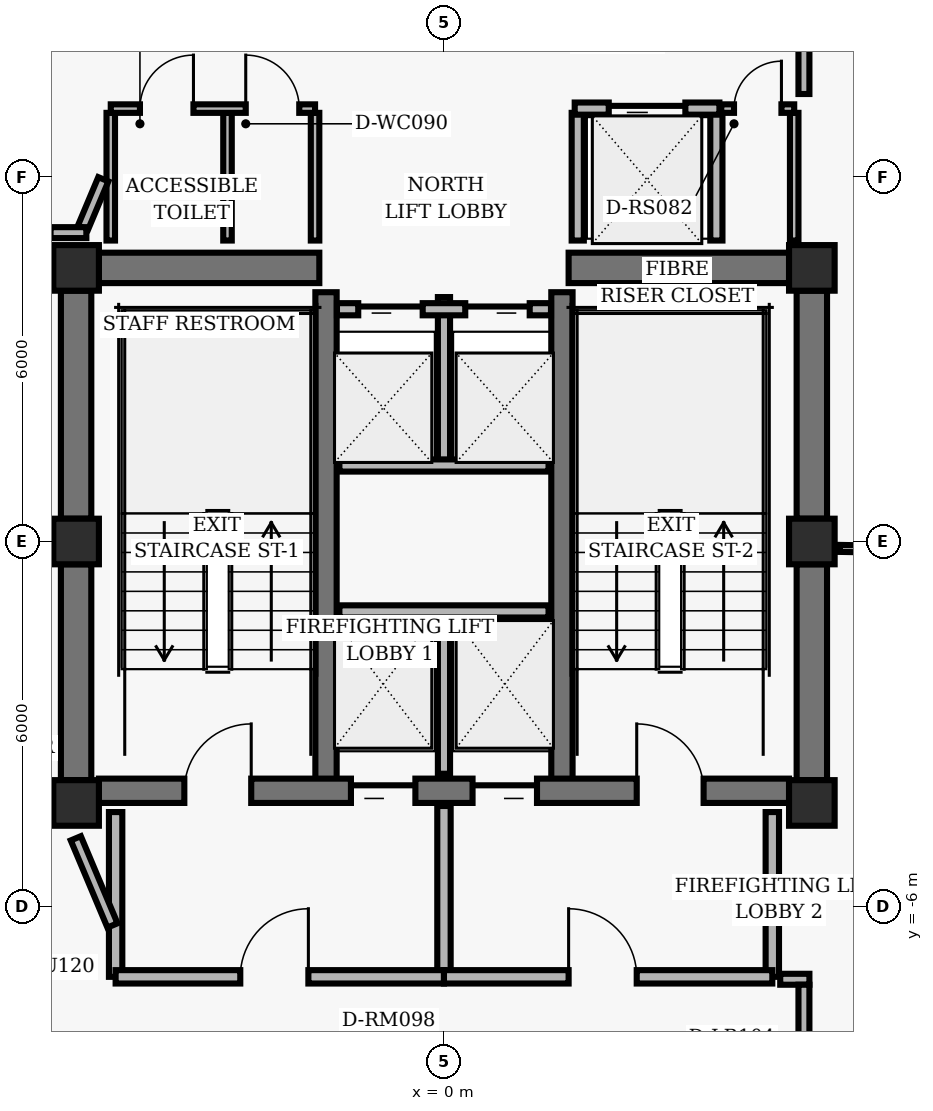
"""IFC4 building model, lengths in metres.
Left out: names, types, materials, properties, quantities, classifications, styles, units other than length and angle.
Written with IfcOpenShell. Run it as: python <this file> out.ifc"""

import sys

from ifc_helpers import new_model, si_unit, direction, frame, frame_2d, origin, origin_2d, place, context, subcontext, project, spatial, rectangle, hollow_rectangle, extrude, element, fill, save


model = new_model("IFC4")
c1 = context("Model", 3, precision=1e-05, world=origin(), true_north=direction((0.0, 1.0)))
c2 = subcontext(c1, "Body", "Model", "MODEL_VIEW")
j1 = project(units=[si_unit("LENGTHUNIT", "METRE"), si_unit("PLANEANGLEUNIT", "RADIAN")], contexts=[c1])
p1 = place(None, origin())
s1 = spatial("IfcSite", under=j1, at=p1, CompositionType="ELEMENT")
p2 = place(p1, origin())
s2 = spatial("IfcBuilding", under=s1, at=p2, CompositionType="ELEMENT")
p3 = place(p2, frame((0.0, 0.0, 208.8)))
s3 = spatial("IfcBuildingStorey", under=s2, at=p3, CompositionType="ELEMENT", Elevation=208.8)
for number, where, z_axis, x_axis in (
    (1, (-6.05, 4.5, 0.0), (0.0, 0.0, 1.0), (1.0, 0.0, 0.0)),
    (2, (6.05, 4.5, 0.0), (0.0, 0.0, 1.0), (1.0, 0.0, 0.0)),
    (3, (-6.05, 0.0, 0.0), (0.0, 0.0, 1.0), (1.0, 0.0, 0.0)),
    (4, (6.05, 0.0, 0.0), (0.0, 0.0, 1.0), (1.0, 0.0, 0.0)),
    (5, (-6.05, -4.3, 0.0), (0.0, 0.0, 1.0), (1.0, 0.0, 0.0)),
    (6, (6.05, -4.3, 0.0), (0.0, 0.0, 1.0), (1.0, 0.0, 0.0)),
):
    element("IfcColumn", number, at=place(p3, frame(where, z_axis=z_axis, x_axis=x_axis)), inside=s3, PredefinedType="COLUMN", context=c2, shape_type="SweptSolid", body=[
        extrude(hollow_rectangle(XDim=0.75, YDim=0.75, WallThickness=0.05, InnerFilletRadius=0.02, OuterFilletRadius=0.04, at=origin_2d()), origin(), (0.0, 0.0, 1.0), 3.04),
    ])
p4 = place(p3, frame((-6.05, 0.375, 0.0), z_axis=(0.0, 0.0, 1.0), x_axis=(0.0, 1.0, 0.0)))
e7 = element("IfcWall", 7, at=p4, inside=s3, PredefinedType="SHEAR", context=c2, shape_type="SweptSolid", body=[
    extrude(rectangle(XDim=3.75, YDim=0.5, at=frame_2d((1.875, 0.0))), origin(), (0.0, 0.0, 1.0), 2.798),
])
p5 = place(p3, frame((-6.05, -3.925, 0.0), z_axis=(0.0, 0.0, 1.0), x_axis=(0.0, 1.0, 0.0)))
e8 = element("IfcWall", 8, at=p5, inside=s3, PredefinedType="SHEAR", context=c2, shape_type="SweptSolid", body=[
    extrude(rectangle(XDim=3.55, YDim=0.5, at=frame_2d((1.775, 0.0))), origin(), (0.0, 0.0, 1.0), 2.798),
])
p6 = place(p3, frame((6.05, 0.375, 0.0), z_axis=(0.0, 0.0, 1.0), x_axis=(0.0, 1.0, 0.0)))
e9 = element("IfcWall", 9, at=p6, inside=s3, PredefinedType="SHEAR", context=c2, shape_type="SweptSolid", body=[
    extrude(rectangle(XDim=3.75, YDim=0.5, at=frame_2d((1.875, 0.0))), origin(), (0.0, 0.0, 1.0), 2.798),
])
p7 = place(p3, frame((6.05, -3.925, 0.0), z_axis=(0.0, 0.0, 1.0), x_axis=(0.0, 1.0, 0.0)))
e10 = element("IfcWall", 10, at=p7, inside=s3, PredefinedType="SHEAR", context=c2, shape_type="SweptSolid", body=[
    extrude(rectangle(XDim=3.55, YDim=0.5, at=frame_2d((1.775, 0.0))), origin(), (0.0, 0.0, 1.0), 2.798),
])
for number, where, z_axis, x_axis in (
    (11, (-1.94, -4.1, 0.0), (0.0, 0.0, 1.0), (0.0, 1.0, 0.0)),
    (12, (1.94, -4.1, 0.0), (0.0, 0.0, 1.0), (0.0, 1.0, 0.0)),
):
    element("IfcWall", number, at=place(p3, frame(where, z_axis=z_axis, x_axis=x_axis)), inside=s3, PredefinedType="SHEAR", context=c2, shape_type="SweptSolid", body=[
        extrude(rectangle(XDim=8.2, YDim=0.35, at=frame_2d((4.1, 0.0))), origin(), (0.0, 0.0, 1.0), 2.798),
    ])
p8 = place(p3, frame((-5.675, -4.1, 0.0), z_axis=(0.0, 0.0, 1.0), x_axis=(1.0, 0.0, 0.0)))
e13 = element("IfcWall", 13, at=p8, inside=s3, PredefinedType="SHEAR", context=c2, shape_type="SweptSolid", body=[
    extrude(rectangle(XDim=11.35, YDim=0.4, at=frame_2d((5.675, 0.0))), origin(), (0.0, 0.0, 1.0), 2.798),
])
p9 = place(p8, frame((1.405, 0.0, 0.0)))
e14 = element("IfcOpeningElement", 14, at=p9, cuts=e13, PredefinedType="OPENING", context=c2, shape_type="SweptSolid", body=[
    extrude(rectangle(XDim=1.1, YDim=2.04, at=frame_2d((0.55, 1.02))), frame((0.0, 0.21, 0.0), z_axis=(0.0, -1.0, 0.0), x_axis=(1.0, 0.0, 0.0)), (0.0, 0.0, 1.0), 0.42),
])
p10 = place(p8, frame((8.845, 0.0, 0.0)))
e15 = element("IfcOpeningElement", 15, at=p10, cuts=e13, PredefinedType="OPENING", context=c2, shape_type="SweptSolid", body=[
    extrude(rectangle(XDim=1.1, YDim=2.04, at=frame_2d((0.55, 1.02))), frame((0.0, 0.21, 0.0), z_axis=(0.0, -1.0, 0.0), x_axis=(1.0, 0.0, 0.0)), (0.0, 0.0, 1.0), 0.42),
])
p11 = place(p8, frame((4.145, 0.0, 0.0)))
e16 = element("IfcOpeningElement", 16, at=p11, cuts=e13, PredefinedType="OPENING", context=c2, shape_type="SweptSolid", body=[
    extrude(rectangle(XDim=1.06, YDim=2.04, at=frame_2d((0.53, 1.02))), frame((0.0, 0.21, 0.0), z_axis=(0.0, -1.0, 0.0), x_axis=(1.0, 0.0, 0.0)), (0.0, 0.0, 1.0), 0.42),
])
p12 = place(p8, frame((6.145, 0.0, 0.0)))
e17 = element("IfcOpeningElement", 17, at=p12, cuts=e13, PredefinedType="OPENING", context=c2, shape_type="SweptSolid", body=[
    extrude(rectangle(XDim=1.06, YDim=2.04, at=frame_2d((0.53, 1.02))), frame((0.0, 0.21, 0.0), z_axis=(0.0, -1.0, 0.0), x_axis=(1.0, 0.0, 0.0)), (0.0, 0.0, 1.0), 0.42),
])
for number, where, z_axis, x_axis in (
    (18, (-5.675, 4.5, 0.0), (0.0, 0.0, 1.0), (1.0, 0.0, 0.0)),
    (19, (2.05, 4.5, 0.0), (0.0, 0.0, 1.0), (1.0, 0.0, 0.0)),
):
    element("IfcWall", number, at=place(p3, frame(where, z_axis=z_axis, x_axis=x_axis)), inside=s3, PredefinedType="SHEAR", context=c2, shape_type="SweptSolid", body=[
        extrude(rectangle(XDim=3.625, YDim=0.5, at=frame_2d((1.812, 0.0))), origin(), (0.0, 0.0, 1.0), 2.798),
    ])
p13 = place(p3, frame((0.0, -3.82, 0.0), z_axis=(0.0, 0.0, 1.0), x_axis=(0.0, 1.0, 0.0)))
e20 = element("IfcWall", 20, at=p13, inside=s3, PredefinedType="PARTITIONING", context=c2, shape_type="SweptSolid", body=[
    extrude(rectangle(XDim=2.67, YDim=0.2, at=frame_2d((1.335, 0.0))), origin(), (0.0, 0.0, 1.0), 2.773),
])
p14 = place(p3, frame((-1.72, -1.15, 0.0), z_axis=(0.0, 0.0, 1.0), x_axis=(1.0, 0.0, 0.0)))
e21 = element("IfcWall", 21, at=p14, inside=s3, PredefinedType="PARTITIONING", context=c2, shape_type="SweptSolid", body=[
    extrude(rectangle(XDim=3.44, YDim=0.2, at=frame_2d((1.72, 0.0))), origin(), (0.0, 0.0, 1.0), 2.773),
])
for number, where, z_axis, x_axis in (
    (22, (-5.4, -7.16, 0.0), (0.0, 0.0, 1.0), (0.0, 1.0, 0.0)),
    (23, (5.4, -7.16, 0.0), (0.0, 0.0, 1.0), (0.0, 1.0, 0.0)),
):
    element("IfcWall", number, at=place(p3, frame(where, z_axis=z_axis, x_axis=x_axis)), inside=s3, PredefinedType="PARTITIONING", context=c2, shape_type="SweptSolid", body=[
        extrude(rectangle(XDim=2.71, YDim=0.22, at=frame_2d((1.355, 0.0))), origin(), (0.0, 0.0, 1.0), 2.773),
    ])
p15 = place(p3, frame((0.0, -7.16, 0.0), z_axis=(0.0, 0.0, 1.0), x_axis=(0.0, 1.0, 0.0)))
e24 = element("IfcWall", 24, at=p15, inside=s3, PredefinedType="PARTITIONING", context=c2, shape_type="SweptSolid", body=[
    extrude(rectangle(XDim=2.81, YDim=0.22, at=frame_2d((1.405, 0.0))), origin(), (0.0, 0.0, 1.0), 2.773),
])
p16 = place(p3, frame((-5.4, -7.16, 0.0), z_axis=(0.0, 0.0, 1.0), x_axis=(1.0, 0.0, 0.0)))
e25 = element("IfcWall", 25, at=p16, inside=s3, PredefinedType="PARTITIONING", context=c2, shape_type="SweptSolid", body=[
    extrude(rectangle(XDim=5.4, YDim=0.22, at=frame_2d((2.7, 0.0))), origin(), (0.0, 0.0, 1.0), 2.395),
])
p17 = place(p16, frame((2.05, 0.0, 0.0)))
e26 = element("IfcOpeningElement", 26, at=p17, cuts=e25, PredefinedType="OPENING", context=c2, shape_type="SweptSolid", body=[
    extrude(rectangle(XDim=1.12, YDim=2.02, at=frame_2d((0.56, 1.01))), frame((0.0, 0.12, 0.0), z_axis=(0.0, -1.0, 0.0), x_axis=(1.0, 0.0, 0.0)), (0.0, 0.0, 1.0), 0.24),
])
p18 = place(p3, frame((0.0, -7.16, 0.0), z_axis=(0.0, 0.0, 1.0), x_axis=(1.0, 0.0, 0.0)))
e27 = element("IfcWall", 27, at=p18, inside=s3, PredefinedType="PARTITIONING", context=c2, shape_type="SweptSolid", body=[
    extrude(rectangle(XDim=5.4, YDim=0.22, at=frame_2d((2.7, 0.0))), origin(), (0.0, 0.0, 1.0), 2.773),
])
p19 = place(p18, frame((2.05, 0.0, 0.0)))
e28 = element("IfcOpeningElement", 28, at=p19, cuts=e27, PredefinedType="OPENING", context=c2, shape_type="SweptSolid", body=[
    extrude(rectangle(XDim=1.12, YDim=2.02, at=frame_2d((0.56, 1.01))), frame((0.0, 0.12, 0.0), z_axis=(0.0, -1.0, 0.0), x_axis=(1.0, 0.0, 0.0)), (0.0, 0.0, 1.0), 0.24),
])
p20 = place(p3, frame((0.0, 1.25, 0.0), z_axis=(0.0, 0.0, 1.0), x_axis=(0.0, 1.0, 0.0)))
e29 = element("IfcWall", 29, at=p20, inside=s3, PredefinedType="PARTITIONING", context=c2, shape_type="SweptSolid", body=[
    extrude(rectangle(XDim=2.77, YDim=0.2, at=frame_2d((1.385, 0.0))), origin(), (0.0, 0.0, 1.0), 2.773),
])
p21 = place(p3, frame((-1.72, 1.25, 0.0), z_axis=(0.0, 0.0, 1.0), x_axis=(1.0, 0.0, 0.0)))
e30 = element("IfcWall", 30, at=p21, inside=s3, PredefinedType="PARTITIONING", context=c2, shape_type="SweptSolid", body=[
    extrude(rectangle(XDim=3.44, YDim=0.2, at=frame_2d((1.72, 0.0))), origin(), (0.0, 0.0, 1.0), 2.773),
])
p22 = place(p3, frame((-1.76, 3.82, 0.0), z_axis=(0.0, 0.0, 1.0), x_axis=(1.0, 0.0, 0.0)))
e31 = element("IfcWall", 31, at=p22, inside=s3, PredefinedType="PARTITIONING", context=c2, shape_type="SweptSolid", body=[
    extrude(rectangle(XDim=3.52, YDim=0.2, at=frame_2d((1.76, 0.0))), origin(), (0.0, 0.0, 1.0), 2.773),
])
p23 = place(p22, frame((0.35, 0.0, 0.0)))
e32 = element("IfcOpeningElement", 32, at=p23, cuts=e31, PredefinedType="OPENING", context=c2, shape_type="SweptSolid", body=[
    extrude(rectangle(XDim=1.06, YDim=2.04, at=frame_2d((0.53, 1.02))), frame((0.0, 0.11, 0.0), z_axis=(0.0, -1.0, 0.0), x_axis=(1.0, 0.0, 0.0)), (0.0, 0.0, 1.0), 0.22),
])
p24 = place(p22, frame((2.11, 0.0, 0.0)))
e33 = element("IfcOpeningElement", 33, at=p24, cuts=e31, PredefinedType="OPENING", context=c2, shape_type="SweptSolid", body=[
    extrude(rectangle(XDim=1.06, YDim=2.04, at=frame_2d((0.53, 1.02))), frame((0.0, 0.11, 0.0), z_axis=(0.0, -1.0, 0.0), x_axis=(1.0, 0.0, 0.0)), (0.0, 0.0, 1.0), 0.22),
])
for number, where, z_axis, x_axis in (
    (34, (2.2, 4.95, 0.0), (0.0, 0.0, 1.0), (0.0, 1.0, 0.0)),
    (35, (4.48, 4.95, 0.0), (0.0, 0.0, 1.0), (0.0, 1.0, 0.0)),
):
    element("IfcWall", number, at=place(p3, frame(where, z_axis=z_axis, x_axis=x_axis)), inside=s3, PredefinedType="PARTITIONING", context=c2, shape_type="SweptSolid", body=[
        extrude(rectangle(XDim=2.1, YDim=0.2, at=frame_2d((1.05, 0.0))), origin(), (0.0, 0.0, 1.0), 2.773),
    ])
p25 = place(p3, frame((2.15, 7.12, 0.0), z_axis=(0.0, 0.0, 1.0), x_axis=(1.0, 0.0, 0.0)))
e36 = element("IfcWall", 36, at=p25, inside=s3, PredefinedType="PARTITIONING", context=c2, shape_type="SweptSolid", body=[
    extrude(rectangle(XDim=2.38, YDim=0.2, at=frame_2d((1.19, 0.0))), origin(), (0.0, 0.0, 1.0), 2.773),
])
p26 = place(p25, frame((0.56, 0.0, 0.0)))
e37 = element("IfcOpeningElement", 37, at=p26, cuts=e36, PredefinedType="OPENING", context=c2, shape_type="SweptSolid", body=[
    extrude(rectangle(XDim=1.26, YDim=2.06, at=frame_2d((0.63, 1.03))), frame((0.0, 0.11, 0.0), z_axis=(0.0, -1.0, 0.0), x_axis=(1.0, 0.0, 0.0)), (0.0, 0.0, 1.0), 0.22),
])
for number, where, z_axis, x_axis in (
    (38, (-5.48, 4.95, 0.0), (0.0, 0.0, 1.0), (0.0, 1.0, 0.0)),
    (39, (-3.56, 4.95, 0.0), (0.0, 0.0, 1.0), (0.0, 1.0, 0.0)),
    (40, (-2.12, 4.95, 0.0), (0.0, 0.0, 1.0), (0.0, 1.0, 0.0)),
):
    element("IfcWall", number, at=place(p3, frame(where, z_axis=z_axis, x_axis=x_axis)), inside=s3, PredefinedType="PARTITIONING", context=c2, shape_type="SweptSolid", body=[
        extrude(rectangle(XDim=2.1, YDim=0.14, at=frame_2d((1.05, 0.0))), origin(), (0.0, 0.0, 1.0), 2.773),
    ])
p27 = place(p3, frame((-5.48, 7.12, 0.0), z_axis=(0.0, 0.0, 1.0), x_axis=(1.0, 0.0, 0.0)))
e41 = element("IfcWall", 41, at=p27, inside=s3, PredefinedType="PARTITIONING", context=c2, shape_type="SweptSolid", body=[
    extrude(rectangle(XDim=3.36, YDim=0.14, at=frame_2d((1.68, 0.0))), origin(), (0.0, 0.0, 1.0), 2.773),
])
p28 = place(p27, frame((0.48, 0.0, 0.0)))
e42 = element("IfcOpeningElement", 42, at=p28, cuts=e41, PredefinedType="OPENING", context=c2, shape_type="SweptSolid", body=[
    extrude(rectangle(XDim=0.88, YDim=2.02, at=frame_2d((0.44, 1.01))), frame((0.0, 0.08, 0.0), z_axis=(0.0, -1.0, 0.0), x_axis=(1.0, 0.0, 0.0)), (0.0, 0.0, 1.0), 0.16),
])
p29 = place(p27, frame((2.22, 0.0, 0.0)))
e43 = element("IfcOpeningElement", 43, at=p29, cuts=e41, PredefinedType="OPENING", context=c2, shape_type="SweptSolid", body=[
    extrude(rectangle(XDim=0.88, YDim=2.02, at=frame_2d((0.44, 1.01))), frame((0.0, 0.08, 0.0), z_axis=(0.0, -1.0, 0.0), x_axis=(1.0, 0.0, 0.0)), (0.0, 0.0, 1.0), 0.16),
])
p30 = place(p3, frame((5.76, 4.95, 0.0), z_axis=(0.0, 0.0, 1.0), x_axis=(0.0, 1.0, 0.0)))
e44 = element("IfcWall", 44, at=p30, inside=s3, PredefinedType="PARTITIONING", context=c2, shape_type="SweptSolid", body=[
    extrude(rectangle(XDim=2.1, YDim=0.14, at=frame_2d((1.05, 0.0))), origin(), (0.0, 0.0, 1.0), 2.253),
])
p31 = place(p3, frame((4.56, 7.12, 0.0), z_axis=(0.0, 0.0, 1.0), x_axis=(1.0, 0.0, 0.0)))
e45 = element("IfcWall", 45, at=p31, inside=s3, PredefinedType="PARTITIONING", context=c2, shape_type="SweptSolid", body=[
    extrude(rectangle(XDim=1.2, YDim=0.14, at=frame_2d((0.6, 0.0))), origin(), (0.0, 0.0, 1.0), 2.773),
])
p32 = place(p31, frame((0.21, 0.0, 0.0)))
e46 = element("IfcOpeningElement", 46, at=p32, cuts=e45, PredefinedType="OPENING", context=c2, shape_type="SweptSolid", body=[
    extrude(rectangle(XDim=0.78, YDim=2.01, at=frame_2d((0.39, 1.005))), frame((0.0, 0.08, 0.0), z_axis=(0.0, -1.0, 0.0), x_axis=(1.0, 0.0, 0.0)), (0.0, 0.0, 1.0), 0.16),
])
p33 = place(p3, frame((5.92, 9.16, 0.0), z_axis=(0.0, 0.0, 1.0), x_axis=(0.0, -1.0, 0.0)))
e47 = element("IfcWall", 47, at=p33, inside=s3, PredefinedType="PARTITIONING", context=c2, shape_type="SweptSolid", body=[
    extrude(rectangle(XDim=1.8, YDim=0.18, at=frame_2d((0.9, 0.0))), origin(), (0.0, 0.0, 1.0), 2.773),
])
p34 = place(p3, frame((-5.602, 5.958, 0.0), z_axis=(0.0, 0.0, 1.0), x_axis=(-0.387588639363, -0.921832439566, 0.0)))
e48 = element("IfcWall", 48, at=p34, inside=s3, PredefinedType="PARTITIONING", context=c2, shape_type="SweptSolid", body=[
    extrude(rectangle(XDim=0.862, YDim=0.18, at=frame_2d((0.431, 0.0))), origin(), (0.0, 0.0, 1.0), 2.773),
])
p35 = place(p3, frame((-5.881, 5.08, 0.0), z_axis=(0.0, 0.0, 1.0), x_axis=(-1.0, 0.0, 0.0)))
e49 = element("IfcWall", 49, at=p35, inside=s3, PredefinedType="PARTITIONING", context=c2, shape_type="SweptSolid", body=[
    extrude(rectangle(XDim=0.589, YDim=0.18, at=frame_2d((0.294, 0.0))), origin(), (0.0, 0.0, 1.0), 2.773),
])
p36 = place(p3, frame((-6.055, -4.882, 0.0), z_axis=(0.0, 0.0, 1.0), x_axis=(0.387579540458, -0.921836265189, 0.0)))
e50 = element("IfcWall", 50, at=p36, inside=s3, PredefinedType="PARTITIONING", context=c2, shape_type="SweptSolid", body=[
    extrude(rectangle(XDim=1.555, YDim=0.18, at=frame_2d((0.777, 0.0))), origin(), (0.0, 0.0, 1.0), 2.253),
])
p37 = place(p3, frame((5.53, -7.2, 0.0), z_axis=(0.0, 0.0, 1.0), x_axis=(1.0, 0.0, 0.0)))
e51 = element("IfcWall", 51, at=p37, inside=s3, PredefinedType="PARTITIONING", context=c2, shape_type="SweptSolid", body=[
    extrude(rectangle(XDim=0.48, YDim=0.18, at=frame_2d((0.24, 0.0))), origin(), (0.0, 0.0, 1.0), 2.773),
])
p38 = place(p3, frame((5.92, -7.29, 0.0), z_axis=(0.0, 0.0, 1.0), x_axis=(0.0, -1.0, 0.0)))
e52 = element("IfcWall", 52, at=p38, inside=s3, PredefinedType="PARTITIONING", context=c2, shape_type="SweptSolid", body=[
    extrude(rectangle(XDim=1.82, YDim=0.18, at=frame_2d((0.91, 0.0))), origin(), (0.0, 0.0, 1.0), 2.773),
])
p39 = place(p3, frame((6.51, -0.114, 0.0), z_axis=(0.0, 0.0, 1.0), x_axis=(0.999847502382, -0.017463446992, 0.0)))
e53 = element("IfcWall", 53, at=p39, inside=s3, PredefinedType="MOVABLE", context=c2, shape_type="SweptSolid", body=[
    extrude(rectangle(XDim=5.62, YDim=0.115, at=frame_2d((2.81, 0.0))), origin(), (0.0, 0.0, 1.0), 2.773),
])
p40 = place(p9, origin())
e54 = element("IfcDoor", 54, at=p40, inside=s3, OperationType="SINGLE_SWING_RIGHT", PredefinedType="DOOR", context=c2, shape_type="SweptSolid", body=[
    extrude(rectangle(XDim=1.1, YDim=2.04, at=frame_2d((0.55, 1.02))), frame((0.0, 0.025, 0.0), z_axis=(0.0, -1.0, 0.0), x_axis=(1.0, 0.0, 0.0)), (0.0, 0.0, 1.0), 0.05),
])
fill(e14, e54)
p41 = place(p10, origin())
e55 = element("IfcDoor", 55, at=p41, inside=s3, OperationType="SINGLE_SWING_LEFT", PredefinedType="DOOR", context=c2, shape_type="SweptSolid", body=[
    extrude(rectangle(XDim=1.1, YDim=2.04, at=frame_2d((0.55, 1.02))), frame((0.0, 0.025, 0.0), z_axis=(0.0, -1.0, 0.0), x_axis=(1.0, 0.0, 0.0)), (0.0, 0.0, 1.0), 0.05),
])
fill(e15, e55)
p42 = place(p11, origin())
e56 = element("IfcDoor", 56, at=p42, inside=s3, OperationType="SLIDING_TO_LEFT", PredefinedType="DOOR", context=c2, shape_type="SweptSolid", body=[
    extrude(rectangle(XDim=1.06, YDim=2.04, at=frame_2d((0.53, 1.02))), frame((0.0, 0.025, 0.0), z_axis=(0.0, -1.0, 0.0), x_axis=(1.0, 0.0, 0.0)), (0.0, 0.0, 1.0), 0.05),
])
fill(e16, e56)
p43 = place(p12, origin())
e57 = element("IfcDoor", 57, at=p43, inside=s3, OperationType="SLIDING_TO_RIGHT", PredefinedType="DOOR", context=c2, shape_type="SweptSolid", body=[
    extrude(rectangle(XDim=1.06, YDim=2.04, at=frame_2d((0.53, 1.02))), frame((0.0, 0.025, 0.0), z_axis=(0.0, -1.0, 0.0), x_axis=(1.0, 0.0, 0.0)), (0.0, 0.0, 1.0), 0.05),
])
fill(e17, e57)
p44 = place(p17, origin())
e58 = element("IfcDoor", 58, at=p44, inside=s3, OperationType="SINGLE_SWING_RIGHT", PredefinedType="DOOR", context=c2, shape_type="SweptSolid", body=[
    extrude(rectangle(XDim=1.12, YDim=2.02, at=frame_2d((0.56, 1.01))), frame((0.0, 0.025, 0.0), z_axis=(0.0, -1.0, 0.0), x_axis=(1.0, 0.0, 0.0)), (0.0, 0.0, 1.0), 0.05),
])
fill(e26, e58)
p45 = place(p19, origin())
e59 = element("IfcDoor", 59, at=p45, inside=s3, OperationType="SINGLE_SWING_LEFT", PredefinedType="DOOR", context=c2, shape_type="SweptSolid", body=[
    extrude(rectangle(XDim=1.12, YDim=2.02, at=frame_2d((0.56, 1.01))), frame((0.0, 0.025, 0.0), z_axis=(0.0, -1.0, 0.0), x_axis=(1.0, 0.0, 0.0)), (0.0, 0.0, 1.0), 0.05),
])
fill(e28, e59)
p46 = place(p23, origin())
e60 = element("IfcDoor", 60, at=p46, inside=s3, OperationType="SLIDING_TO_LEFT", PredefinedType="DOOR", context=c2, shape_type="SweptSolid", body=[
    extrude(rectangle(XDim=1.06, YDim=2.04, at=frame_2d((0.53, 1.02))), frame((0.0, 0.025, 0.0), z_axis=(0.0, -1.0, 0.0), x_axis=(1.0, 0.0, 0.0)), (0.0, 0.0, 1.0), 0.05),
])
fill(e32, e60)
p47 = place(p24, origin())
e61 = element("IfcDoor", 61, at=p47, inside=s3, OperationType="SLIDING_TO_RIGHT", PredefinedType="DOOR", context=c2, shape_type="SweptSolid", body=[
    extrude(rectangle(XDim=1.06, YDim=2.04, at=frame_2d((0.53, 1.02))), frame((0.0, 0.025, 0.0), z_axis=(0.0, -1.0, 0.0), x_axis=(1.0, 0.0, 0.0)), (0.0, 0.0, 1.0), 0.05),
])
fill(e33, e61)
p48 = place(p26, origin())
e62 = element("IfcDoor", 62, at=p48, inside=s3, OperationType="SLIDING_TO_LEFT", PredefinedType="DOOR", context=c2, shape_type="SweptSolid", body=[
    extrude(rectangle(XDim=1.26, YDim=2.06, at=frame_2d((0.63, 1.03))), frame((0.0, 0.025, 0.0), z_axis=(0.0, -1.0, 0.0), x_axis=(1.0, 0.0, 0.0)), (0.0, 0.0, 1.0), 0.05),
])
fill(e37, e62)
p49 = place(p28, origin())
e63 = element("IfcDoor", 63, at=p49, inside=s3, OperationType="SINGLE_SWING_RIGHT", PredefinedType="DOOR", context=c2, shape_type="SweptSolid", body=[
    extrude(rectangle(XDim=0.88, YDim=2.02, at=frame_2d((0.44, 1.01))), frame((0.0, 0.025, 0.0), z_axis=(0.0, -1.0, 0.0), x_axis=(1.0, 0.0, 0.0)), (0.0, 0.0, 1.0), 0.05),
])
fill(e42, e63)
p50 = place(p29, origin())
e64 = element("IfcDoor", 64, at=p50, inside=s3, OperationType="SINGLE_SWING_LEFT", PredefinedType="DOOR", context=c2, shape_type="SweptSolid", body=[
    extrude(rectangle(XDim=0.88, YDim=2.02, at=frame_2d((0.44, 1.01))), frame((0.0, 0.025, 0.0), z_axis=(0.0, -1.0, 0.0), x_axis=(1.0, 0.0, 0.0)), (0.0, 0.0, 1.0), 0.05),
])
fill(e43, e64)
p51 = place(p32, origin())
e65 = element("IfcDoor", 65, at=p51, inside=s3, OperationType="SINGLE_SWING_RIGHT", PredefinedType="DOOR", context=c2, shape_type="SweptSolid", body=[
    extrude(rectangle(XDim=0.78, YDim=2.01, at=frame_2d((0.39, 1.005))), frame((0.0, 0.025, 0.0), z_axis=(0.0, -1.0, 0.0), x_axis=(1.0, 0.0, 0.0)), (0.0, 0.0, 1.0), 0.05),
])
fill(e46, e65)
save(model, sys.argv[1])
